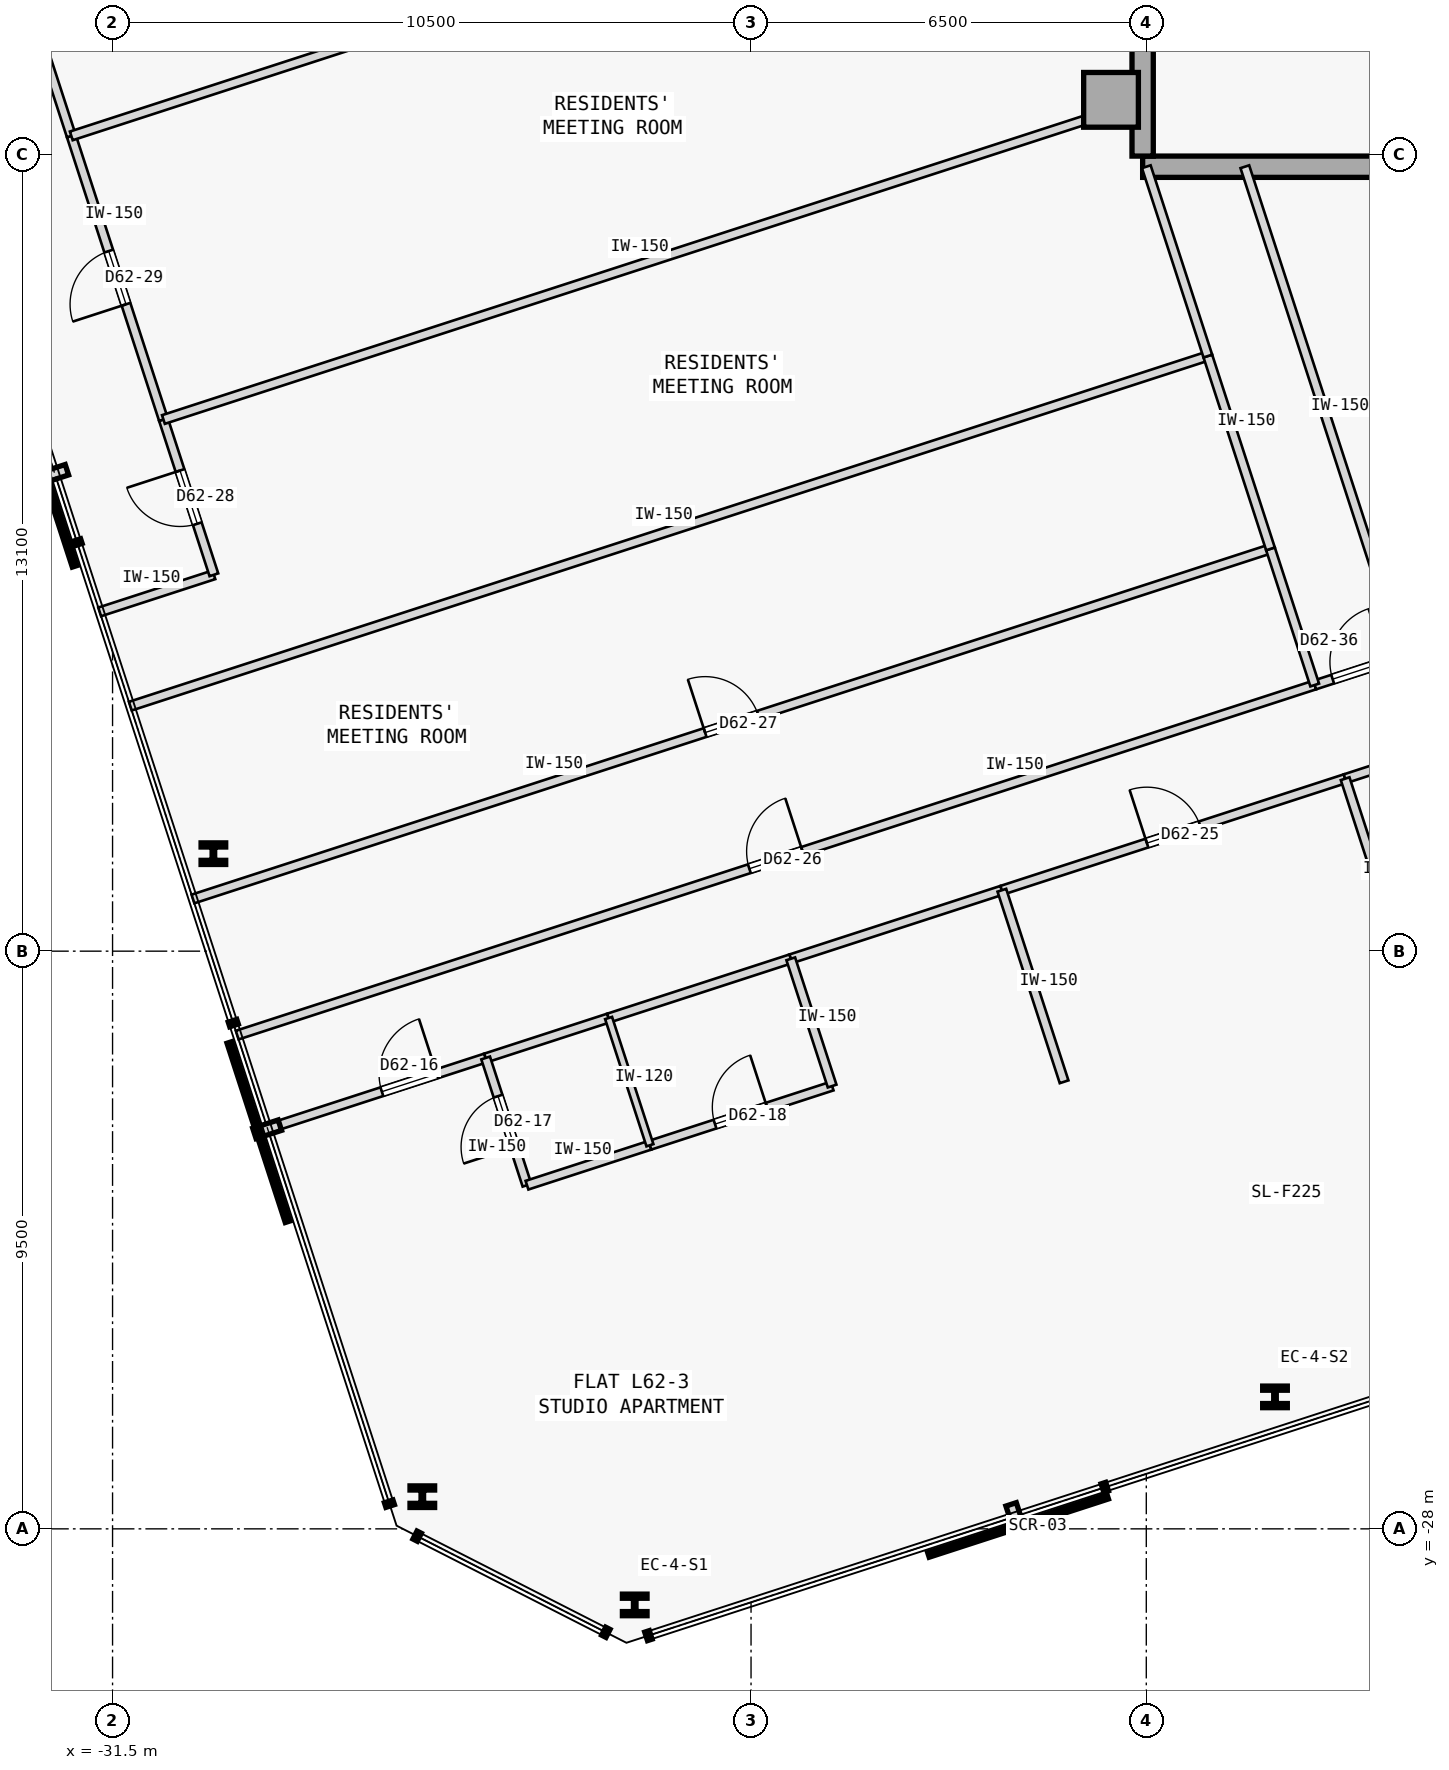
"""IFC4 building model, lengths in metres.
Left out: names, types, materials, properties, quantities, classifications, styles, units other than length and angle.
Written with IfcOpenShell. Run it as: python <this file> out.ifc"""

import sys

from ifc_helpers import new_model, si_unit, direction, frame, frame_2d, origin, origin_2d, place, context, subcontext, project, spatial, rectangle, i_section, extrude, element, fill, save


model = new_model("IFC4")
c1 = context("Model", 3, precision=1e-05, world=origin(), true_north=direction((0.0, 1.0)))
c2 = subcontext(c1, "Body", "Model", "MODEL_VIEW")
j1 = project(units=[si_unit("LENGTHUNIT", "METRE"), si_unit("PLANEANGLEUNIT", "RADIAN")], contexts=[c1])
p1 = place(None, origin())
s1 = spatial("IfcSite", under=j1, at=p1, CompositionType="ELEMENT")
p2 = place(p1, origin())
s2 = spatial("IfcBuilding", under=s1, at=p2, CompositionType="ELEMENT")
p3 = place(p2, frame((0.0, 0.0, 234.35)))
s3 = spatial("IfcBuildingStorey", under=s2, at=p3, CompositionType="ELEMENT", Elevation=234.35)
p4 = place(p3, frame((-15.08, -4.5, 0.0), z_axis=(0.0, 0.0, 1.0), x_axis=(1.0, 0.0, 0.0)))
e1 = element("IfcColumn", 1, at=p4, inside=s3, PredefinedType="COLUMN", context=c2, shape_type="SweptSolid", body=[
    extrude(rectangle(XDim=0.9, YDim=0.9, at=origin_2d()), origin(), (0.0, 0.0, 1.0), 3.35),
])
p5 = place(p3, frame((-14.56, -5.6, 0.0), z_axis=(0.0, 0.0, 1.0), x_axis=(1.0, 0.0, 0.0)))
e2 = element("IfcWall", 2, at=p5, inside=s3, PredefinedType="SHEAR", context=c2, shape_type="SweptSolid", body=[
    extrude(rectangle(XDim=10.86, YDim=0.35, at=frame_2d((5.43, 0.0))), origin(), (0.0, 0.0, 1.0), 3.125),
])
p6 = place(p3, frame((-14.56, -5.425, 0.0), z_axis=(0.0, 0.0, 1.0), x_axis=(0.0, 1.0, 0.0)))
e3 = element("IfcWall", 3, at=p6, inside=s3, PredefinedType="SHEAR", context=c2, shape_type="SweptSolid", body=[
    extrude(rectangle(XDim=10.85, YDim=0.35, at=frame_2d((5.425, 0.0))), origin(), (0.0, 0.0, 1.0), 3.125),
])
for number, where, z_axis, x_axis in (
    (4, (-22.913, -29.251, 0.0), (0.0, 0.0, 1.0), (1.0, 0.0, 0.0)),
    (5, (-12.384, -25.83, 0.0), (0.0, 0.0, 1.0), (1.0, 0.0, 0.0)),
    (6, (-29.842, -16.897, 0.0), (0.0, 0.0, 1.0), (1.0, 0.0, 0.0)),
    (7, (-26.406, -27.471, 0.0), (0.0, 0.0, 1.0), (1.0, 0.0, 0.0)),
):
    element("IfcColumn", number, at=place(p3, frame(where, z_axis=z_axis, x_axis=x_axis)), inside=s3, PredefinedType="COLUMN", context=c2, shape_type="SweptSolid", body=[
        extrude(i_section(OverallWidth=0.405, OverallDepth=0.355, WebThickness=0.042, FlangeThickness=0.068, FilletRadius=0.015, at=origin_2d()), origin(), (0.0, 0.0, 1.0), 3.35),
    ])
p7 = place(p3, frame((-28.95, -21.421, 0.0), z_axis=(0.0, 0.0, 1.0), x_axis=(0.951052151329, 0.309030428036, 0.0)))
e8 = element("IfcWall", 8, at=p7, inside=s3, PredefinedType="PARTITIONING", context=c2, shape_type="SweptSolid", body=[
    extrude(rectangle(XDim=3.77, YDim=0.15, at=frame_2d((1.885, 0.0))), origin(), (0.0, 0.0, 1.0), 3.125),
])
p8 = place(p7, frame((1.975, 0.0, 0.0)))
e9 = element("IfcOpeningElement", 9, at=p8, cuts=e8, PredefinedType="OPENING", context=c2, shape_type="SweptSolid", body=[
    extrude(rectangle(XDim=0.95, YDim=2.15, at=frame_2d((0.475, 1.075))), frame((0.0, 0.085, 0.0), z_axis=(0.0, -1.0, 0.0), x_axis=(1.0, 0.0, 0.0)), (0.0, 0.0, 1.0), 0.17),
])
p9 = place(p3, frame((-20.347, -18.626, 0.0), z_axis=(0.0, 0.0, 1.0), x_axis=(0.951057168147, 0.309014988174, 0.0)))
e10 = element("IfcWall", 10, at=p9, inside=s3, PredefinedType="PARTITIONING", context=c2, shape_type="SweptSolid", body=[
    extrude(rectangle(XDim=3.65, YDim=0.15, at=frame_2d((1.825, 0.0))), origin(), (0.0, 0.0, 1.0), 3.125),
])
p10 = place(p3, frame((-25.365, -20.256, 0.0), z_axis=(0.0, 0.0, 1.0), x_axis=(0.951056007502, 0.309018560274, 0.0)))
e11 = element("IfcWall", 11, at=p10, inside=s3, PredefinedType="PARTITIONING", context=c2, shape_type="SweptSolid", body=[
    extrude(rectangle(XDim=2.126, YDim=0.15, at=frame_2d((1.063, 0.0))), origin(), (0.0, 0.0, 1.0), 3.125),
])
p11 = place(p3, frame((-23.343, -19.599, 0.0), z_axis=(0.0, 0.0, 1.0), x_axis=(0.951058557014, 0.309010713619, 0.0)))
e12 = element("IfcWall", 12, at=p11, inside=s3, PredefinedType="PARTITIONING", context=c2, shape_type="SweptSolid", body=[
    extrude(rectangle(XDim=3.15, YDim=0.15, at=frame_2d((1.575, 0.0))), origin(), (0.0, 0.0, 1.0), 3.125),
])
p12 = place(p3, frame((-16.875, -17.498, 0.0), z_axis=(0.0, 0.0, 1.0), x_axis=(0.951057944303, 0.309012599384, 0.0)))
e13 = element("IfcWall", 13, at=p12, inside=s3, PredefinedType="PARTITIONING", context=c2, shape_type="SweptSolid", body=[
    extrude(rectangle(XDim=5.936, YDim=0.15, at=frame_2d((2.968, 0.0))), origin(), (0.0, 0.0, 1.0), 3.125),
])
p13 = place(p12, frame((2.508, 0.0, 0.0)))
e14 = element("IfcOpeningElement", 14, at=p13, cuts=e13, PredefinedType="OPENING", context=c2, shape_type="SweptSolid", body=[
    extrude(rectangle(XDim=0.92, YDim=2.15, at=frame_2d((0.46, 1.075))), frame((0.0, 0.085, 0.0), z_axis=(0.0, -1.0, 0.0), x_axis=(1.0, 0.0, 0.0)), (0.0, 0.0, 1.0), 0.17),
])
p14 = place(p3, frame((-29.45, -19.881, 0.0), z_axis=(0.0, 0.0, 1.0), x_axis=(0.95105650271, 0.309017036186, 0.0)))
e15 = element("IfcWall", 15, at=p14, inside=s3, PredefinedType="PARTITIONING", context=c2, shape_type="SweptSolid", body=[
    extrude(rectangle(XDim=18.632, YDim=0.15, at=frame_2d((9.316, 0.0))), origin(), (0.0, 0.0, 1.0), 3.125),
])
p15 = place(p14, frame((8.856, 0.0, 0.0)))
e16 = element("IfcOpeningElement", 16, at=p15, cuts=e15, PredefinedType="OPENING", context=c2, shape_type="SweptSolid", body=[
    extrude(rectangle(XDim=0.92, YDim=2.15, at=frame_2d((0.46, 1.075))), frame((0.0, 0.085, 0.0), z_axis=(0.0, -1.0, 0.0), x_axis=(1.0, 0.0, 0.0)), (0.0, 0.0, 1.0), 0.17),
])
p16 = place(p3, frame((-31.712, -12.921, 0.0), z_axis=(0.0, 0.0, 1.0), x_axis=(0.951054051148, 0.309024581215, 0.0)))
e17 = element("IfcWall", 17, at=p16, inside=s3, PredefinedType="PARTITIONING", context=c2, shape_type="SweptSolid", body=[
    extrude(rectangle(XDim=1.975, YDim=0.15, at=frame_2d((0.988, 0.0))), origin(), (0.0, 0.0, 1.0), 3.125),
])
p17 = place(p3, frame((-29.833, -12.311, 0.0), z_axis=(0.0, 0.0, 1.0), x_axis=(-0.309044953986, 0.951047431213, 0.0)))
e18 = element("IfcWall", 18, at=p17, inside=s3, PredefinedType="PARTITIONING", context=c2, shape_type="SweptSolid", body=[
    extrude(rectangle(XDim=2.685, YDim=0.15, at=frame_2d((1.343, 0.0))), origin(), (0.0, 0.0, 1.0), 3.125),
])
p18 = place(p17, frame((0.883, 0.0, 0.0)))
e19 = element("IfcOpeningElement", 19, at=p18, cuts=e18, PredefinedType="OPENING", context=c2, shape_type="SweptSolid", body=[
    extrude(rectangle(XDim=0.92, YDim=2.15, at=frame_2d((0.46, 1.075))), frame((0.0, 0.085, 0.0), z_axis=(0.0, -1.0, 0.0), x_axis=(1.0, 0.0, 0.0)), (0.0, 0.0, 1.0), 0.17),
])
p19 = place(p3, frame((-30.663, -9.757, 0.0), z_axis=(0.0, 0.0, 1.0), x_axis=(-0.309019653166, 0.951055652397, 0.0)))
e20 = element("IfcWall", 20, at=p19, inside=s3, PredefinedType="PARTITIONING", context=c2, shape_type="SweptSolid", body=[
    extrude(rectangle(XDim=4.904, YDim=0.15, at=frame_2d((2.452, 0.0))), origin(), (0.0, 0.0, 1.0), 3.125),
])
p20 = place(p19, frame((1.992, 0.0, 0.0)))
e21 = element("IfcOpeningElement", 21, at=p20, cuts=e20, PredefinedType="OPENING", context=c2, shape_type="SweptSolid", body=[
    extrude(rectangle(XDim=0.92, YDim=2.15, at=frame_2d((0.46, 1.075))), frame((0.0, 0.085, 0.0), z_axis=(0.0, -1.0, 0.0), x_axis=(1.0, 0.0, 0.0)), (0.0, 0.0, 1.0), 0.17),
])
p21 = place(p3, frame((-32.179, -5.093, 0.0), z_axis=(0.0, 0.0, 1.0), x_axis=(-0.309014532869, 0.951057316083, 0.0)))
e22 = element("IfcWall", 22, at=p21, inside=s3, PredefinedType="PARTITIONING", context=c2, shape_type="SweptSolid", body=[
    extrude(rectangle(XDim=4.707, YDim=0.15, at=frame_2d((2.354, 0.0))), origin(), (0.0, 0.0, 1.0), 3.125),
])
p22 = place(p3, frame((-11.23, -15.664, 0.0), z_axis=(0.0, 0.0, 1.0), x_axis=(0.951055579382, 0.309019877882, 0.0)))
e23 = element("IfcWall", 23, at=p22, inside=s3, PredefinedType="PARTITIONING", context=c2, shape_type="SweptSolid", body=[
    extrude(rectangle(XDim=5.504, YDim=0.15, at=frame_2d((2.752, 0.0))), origin(), (0.0, 0.0, 1.0), 3.125),
])
p23 = place(p22, frame((2.292, 0.0, 0.0)))
e24 = element("IfcOpeningElement", 24, at=p23, cuts=e23, PredefinedType="OPENING", context=c2, shape_type="SweptSolid", body=[
    extrude(rectangle(XDim=0.92, YDim=2.15, at=frame_2d((0.46, 1.075))), frame((0.0, 0.085, 0.0), z_axis=(0.0, -1.0, 0.0), x_axis=(1.0, 0.0, 0.0)), (0.0, 0.0, 1.0), 0.17),
])
p24 = place(p3, frame((-11.73, -14.123, 0.0), z_axis=(0.0, 0.0, 1.0), x_axis=(0.951032904484, 0.309089654614, 0.0)))
e25 = element("IfcWall", 25, at=p24, inside=s3, PredefinedType="PARTITIONING", context=c2, shape_type="SweptSolid", body=[
    extrude(rectangle(XDim=1.541, YDim=0.15, at=frame_2d((0.771, 0.0))), origin(), (0.0, 0.0, 1.0), 3.125),
])
p25 = place(p24, frame((0.311, 0.0, 0.0)))
e26 = element("IfcOpeningElement", 26, at=p25, cuts=e25, PredefinedType="OPENING", context=c2, shape_type="SweptSolid", body=[
    extrude(rectangle(XDim=0.92, YDim=2.15, at=frame_2d((0.46, 1.075))), frame((0.0, 0.085, 0.0), z_axis=(0.0, -1.0, 0.0), x_axis=(1.0, 0.0, 0.0)), (0.0, 0.0, 1.0), 0.17),
])
p26 = place(p3, frame((-24.685, -22.349, 0.0), z_axis=(0.0, 0.0, 1.0), x_axis=(-0.309060979314, 0.951042223598, 0.0)))
e27 = element("IfcWall", 27, at=p26, inside=s3, PredefinedType="PARTITIONING", context=c2, shape_type="SweptSolid", body=[
    extrude(rectangle(XDim=2.2, YDim=0.15, at=frame_2d((1.1, 0.0))), origin(), (0.0, 0.0, 1.0), 3.125),
])
p27 = place(p26, frame((0.66, 0.0, 0.0)))
e28 = element("IfcOpeningElement", 28, at=p27, cuts=e27, PredefinedType="OPENING", context=c2, shape_type="SweptSolid", body=[
    extrude(rectangle(XDim=0.88, YDim=2.15, at=frame_2d((0.44, 1.075))), frame((0.0, 0.085, 0.0), z_axis=(0.0, -1.0, 0.0), x_axis=(1.0, 0.0, 0.0)), (0.0, 0.0, 1.0), 0.17),
])
p28 = place(p3, frame((-24.685, -22.349, 0.0), z_axis=(0.0, 0.0, 1.0), x_axis=(0.951056007502, 0.309018560274, 0.0)))
e29 = element("IfcWall", 29, at=p28, inside=s3, PredefinedType="PARTITIONING", context=c2, shape_type="SweptSolid", body=[
    extrude(rectangle(XDim=2.126, YDim=0.15, at=frame_2d((1.063, 0.0))), origin(), (0.0, 0.0, 1.0), 3.125),
])
p29 = place(p3, frame((-22.663, -21.692, 0.0), z_axis=(0.0, 0.0, 1.0), x_axis=(0.951058557014, 0.309010713619, 0.0)))
e30 = element("IfcWall", 30, at=p29, inside=s3, PredefinedType="PARTITIONING", context=c2, shape_type="SweptSolid", body=[
    extrude(rectangle(XDim=3.15, YDim=0.15, at=frame_2d((1.575, 0.0))), origin(), (0.0, 0.0, 1.0), 3.125),
])
p30 = place(p29, frame((1.125, 0.0, 0.0)))
e31 = element("IfcOpeningElement", 31, at=p30, cuts=e30, PredefinedType="OPENING", context=c2, shape_type="SweptSolid", body=[
    extrude(rectangle(XDim=0.9, YDim=2.15, at=frame_2d((0.45, 1.075))), frame((0.0, 0.085, 0.0), z_axis=(0.0, -1.0, 0.0), x_axis=(1.0, 0.0, 0.0)), (0.0, 0.0, 1.0), 0.17),
])
p31 = place(p3, frame((-19.667, -20.718, 0.0), z_axis=(0.0, 0.0, 1.0), x_axis=(-0.309060979314, 0.951042223598, 0.0)))
e32 = element("IfcWall", 32, at=p31, inside=s3, PredefinedType="PARTITIONING", context=c2, shape_type="SweptSolid", body=[
    extrude(rectangle(XDim=2.2, YDim=0.15, at=frame_2d((1.1, 0.0))), origin(), (0.0, 0.0, 1.0), 3.125),
])
p32 = place(p3, frame((-15.852, -20.648, 0.0), z_axis=(0.0, 0.0, 1.0), x_axis=(-0.309009398695, 0.951058984248, 0.0)))
e33 = element("IfcWall", 33, at=p32, inside=s3, PredefinedType="PARTITIONING", context=c2, shape_type="SweptSolid", body=[
    extrude(rectangle(XDim=3.312, YDim=0.15, at=frame_2d((1.656, 0.0))), origin(), (0.0, 0.0, 1.0), 3.125),
])
p33 = place(p3, frame((-22.663, -21.692, 0.0), z_axis=(0.0, 0.0, 1.0), x_axis=(-0.309060979314, 0.951042223598, 0.0)))
e34 = element("IfcWall", 34, at=p33, inside=s3, PredefinedType="PARTITIONING", context=c2, shape_type="SweptSolid", body=[
    extrude(rectangle(XDim=2.2, YDim=0.12, at=frame_2d((1.1, 0.0))), origin(), (0.0, 0.0, 1.0), 3.125),
])
p34 = place(p3, frame((-10.206, -18.814, 0.0), z_axis=(0.0, 0.0, 1.0), x_axis=(-0.309076071769, 0.951037318857, 0.0)))
e35 = element("IfcWall", 35, at=p34, inside=s3, PredefinedType="PARTITIONING", context=c2, shape_type="SweptSolid", body=[
    extrude(rectangle(XDim=3.312, YDim=0.15, at=frame_2d((1.656, 0.0))), origin(), (0.0, 0.0, 1.0), 3.125),
])
p35 = place(p3, frame((-30.178, -17.642, 0.0), z_axis=(0.0, 0.0, 1.0), x_axis=(0.95105650271, 0.309017036186, 0.0)))
e36 = element("IfcWall", 36, at=p35, inside=s3, PredefinedType="PARTITIONING", context=c2, shape_type="SweptSolid", body=[
    extrude(rectangle(XDim=18.632, YDim=0.15, at=frame_2d((9.316, 0.0))), origin(), (0.0, 0.0, 1.0), 3.125),
])
p36 = place(p35, frame((8.856, 0.0, 0.0)))
e37 = element("IfcOpeningElement", 37, at=p36, cuts=e36, PredefinedType="OPENING", context=c2, shape_type="SweptSolid", body=[
    extrude(rectangle(XDim=0.92, YDim=2.15, at=frame_2d((0.46, 1.075))), frame((0.0, 0.085, 0.0), z_axis=(0.0, -1.0, 0.0), x_axis=(1.0, 0.0, 0.0)), (0.0, 0.0, 1.0), 0.17),
])
p37 = place(p3, frame((-11.73, -14.123, 0.0), z_axis=(0.0, 0.0, 1.0), x_axis=(-0.309062621189, 0.951041690035, 0.0)))
e38 = element("IfcWall", 38, at=p37, inside=s3, PredefinedType="PARTITIONING", context=c2, shape_type="SweptSolid", body=[
    extrude(rectangle(XDim=2.354, YDim=0.15, at=frame_2d((1.177, 0.0))), origin(), (0.0, 0.0, 1.0), 3.125),
])
p38 = place(p3, frame((-31.208, -14.471, 0.0), z_axis=(0.0, 0.0, 1.0), x_axis=(0.951057753948, 0.309013185244, 0.0)))
e39 = element("IfcWall", 39, at=p38, inside=s3, PredefinedType="PARTITIONING", context=c2, shape_type="SweptSolid", body=[
    extrude(rectangle(XDim=18.632, YDim=0.15, at=frame_2d((9.316, 0.0))), origin(), (0.0, 0.0, 1.0), 3.125),
])
p39 = place(p3, frame((-12.458, -11.884, 0.0), z_axis=(0.0, 0.0, 1.0), x_axis=(-0.308946982245, 0.951079261766, 0.0)))
e40 = element("IfcWall", 40, at=p39, inside=s3, PredefinedType="PARTITIONING", context=c2, shape_type="SweptSolid", body=[
    extrude(rectangle(XDim=3.334, YDim=0.15, at=frame_2d((1.667, 0.0))), origin(), (0.0, 0.0, 1.0), 3.125),
])
p40 = place(p3, frame((-30.663, -9.757, 0.0), z_axis=(0.0, 0.0, 1.0), x_axis=(0.951058192995, 0.309011833974, 0.0)))
e41 = element("IfcWall", 41, at=p40, inside=s3, PredefinedType="PARTITIONING", context=c2, shape_type="SweptSolid", body=[
    extrude(rectangle(XDim=16.657, YDim=0.15, at=frame_2d((8.329, 0.0))), origin(), (0.0, 0.0, 1.0), 3.125),
])
p41 = place(p3, frame((-13.488, -8.713, 0.0), z_axis=(0.0, 0.0, 1.0), x_axis=(-0.309082700143, 0.951035164687, 0.0)))
e42 = element("IfcWall", 42, at=p41, inside=s3, PredefinedType="PARTITIONING", context=c2, shape_type="SweptSolid", body=[
    extrude(rectangle(XDim=3.274, YDim=0.15, at=frame_2d((1.637, 0.0))), origin(), (0.0, 0.0, 1.0), 3.125),
])
p42 = place(p3, frame((-32.179, -5.093, 0.0), z_axis=(0.0, 0.0, 1.0), x_axis=(0.951053885426, 0.309025091239, 0.0)))
e43 = element("IfcWall", 43, at=p42, inside=s3, PredefinedType="PARTITIONING", context=c2, shape_type="SweptSolid", body=[
    extrude(rectangle(XDim=16.657, YDim=0.15, at=frame_2d((8.329, 0.0))), origin(), (0.0, 0.0, 1.0), 3.125),
])
p43 = place(p3, frame((-10.265, -13.647, 0.0), z_axis=(0.0, 0.0, 1.0), x_axis=(-0.309007776314, 0.951059511375, 0.0)))
e44 = element("IfcWall", 44, at=p43, inside=s3, PredefinedType="PARTITIONING", context=c2, shape_type="SweptSolid", body=[
    extrude(rectangle(XDim=8.461, YDim=0.15, at=frame_2d((4.23, 0.0))), origin(), (0.0, 0.0, 1.0), 3.125),
])
p44 = place(p8, origin())
e45 = element("IfcDoor", 45, at=p44, inside=s3, OperationType="SINGLE_SWING_RIGHT", PredefinedType="DOOR", context=c2, shape_type="SweptSolid", body=[
    extrude(rectangle(XDim=0.95, YDim=2.15, at=frame_2d((0.475, 1.075))), frame((0.0, 0.025, 0.0), z_axis=(0.0, -1.0, 0.0), x_axis=(1.0, 0.0, 0.0)), (0.0, 0.0, 1.0), 0.05),
])
fill(e9, e45)
p45 = place(p27, origin())
e46 = element("IfcDoor", 46, at=p45, inside=s3, OperationType="SINGLE_SWING_LEFT", PredefinedType="DOOR", context=c2, shape_type="SweptSolid", body=[
    extrude(rectangle(XDim=0.88, YDim=2.15, at=frame_2d((0.44, 1.075))), frame((0.0, 0.025, 0.0), z_axis=(0.0, -1.0, 0.0), x_axis=(1.0, 0.0, 0.0)), (0.0, 0.0, 1.0), 0.05),
])
fill(e28, e46)
p46 = place(p30, origin())
e47 = element("IfcDoor", 47, at=p46, inside=s3, OperationType="SINGLE_SWING_RIGHT", PredefinedType="DOOR", context=c2, shape_type="SweptSolid", body=[
    extrude(rectangle(XDim=0.9, YDim=2.15, at=frame_2d((0.45, 1.075))), frame((0.0, 0.025, 0.0), z_axis=(0.0, -1.0, 0.0), x_axis=(1.0, 0.0, 0.0)), (0.0, 0.0, 1.0), 0.05),
])
fill(e31, e47)
p47 = place(p13, origin())
e48 = element("IfcDoor", 48, at=p47, inside=s3, OperationType="SINGLE_SWING_LEFT", PredefinedType="DOOR", context=c2, shape_type="SweptSolid", body=[
    extrude(rectangle(XDim=0.92, YDim=2.15, at=frame_2d((0.46, 1.075))), frame((0.0, 0.025, 0.0), z_axis=(0.0, -1.0, 0.0), x_axis=(1.0, 0.0, 0.0)), (0.0, 0.0, 1.0), 0.05),
])
fill(e14, e48)
p48 = place(p15, origin())
e49 = element("IfcDoor", 49, at=p48, inside=s3, OperationType="SINGLE_SWING_RIGHT", PredefinedType="DOOR", context=c2, shape_type="SweptSolid", body=[
    extrude(rectangle(XDim=0.92, YDim=2.15, at=frame_2d((0.46, 1.075))), frame((0.0, 0.025, 0.0), z_axis=(0.0, -1.0, 0.0), x_axis=(1.0, 0.0, 0.0)), (0.0, 0.0, 1.0), 0.05),
])
fill(e16, e49)
p49 = place(p36, origin())
e50 = element("IfcDoor", 50, at=p49, inside=s3, OperationType="SINGLE_SWING_LEFT", PredefinedType="DOOR", context=c2, shape_type="SweptSolid", body=[
    extrude(rectangle(XDim=0.92, YDim=2.15, at=frame_2d((0.46, 1.075))), frame((0.0, 0.025, 0.0), z_axis=(0.0, -1.0, 0.0), x_axis=(1.0, 0.0, 0.0)), (0.0, 0.0, 1.0), 0.05),
])
fill(e37, e50)
p50 = place(p18, origin())
e51 = element("IfcDoor", 51, at=p50, inside=s3, OperationType="SINGLE_SWING_RIGHT", PredefinedType="DOOR", context=c2, shape_type="SweptSolid", body=[
    extrude(rectangle(XDim=0.92, YDim=2.15, at=frame_2d((0.46, 1.075))), frame((0.0, 0.025, 0.0), z_axis=(0.0, -1.0, 0.0), x_axis=(1.0, 0.0, 0.0)), (0.0, 0.0, 1.0), 0.05),
])
fill(e19, e51)
p51 = place(p20, origin())
e52 = element("IfcDoor", 52, at=p51, inside=s3, OperationType="SINGLE_SWING_LEFT", PredefinedType="DOOR", context=c2, shape_type="SweptSolid", body=[
    extrude(rectangle(XDim=0.92, YDim=2.15, at=frame_2d((0.46, 1.075))), frame((0.0, 0.025, 0.0), z_axis=(0.0, -1.0, 0.0), x_axis=(1.0, 0.0, 0.0)), (0.0, 0.0, 1.0), 0.05),
])
fill(e21, e52)
p52 = place(p25, origin())
e53 = element("IfcDoor", 53, at=p52, inside=s3, OperationType="SINGLE_SWING_RIGHT", PredefinedType="DOOR", context=c2, shape_type="SweptSolid", body=[
    extrude(rectangle(XDim=0.92, YDim=2.15, at=frame_2d((0.46, 1.075))), frame((0.0, 0.025, 0.0), z_axis=(0.0, -1.0, 0.0), x_axis=(1.0, 0.0, 0.0)), (0.0, 0.0, 1.0), 0.05),
])
fill(e26, e53)
save(model, sys.argv[1])
